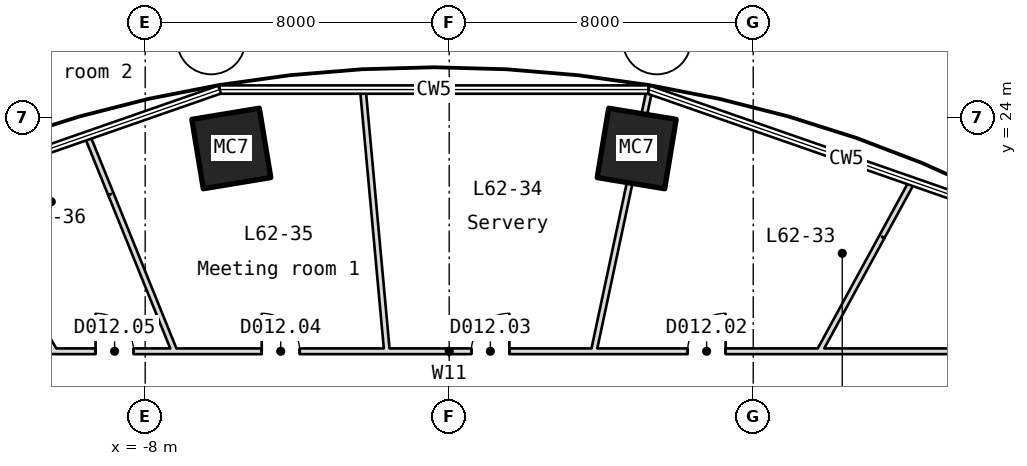
"""IFC4 building model, lengths in metres.
Left out: names, types, materials, properties, quantities, classifications, styles, units other than length and angle.
Written with IfcOpenShell. Run it as: python <this file> out.ifc"""

import sys

from ifc_helpers import new_model, si_unit, direction, frame, frame_2d, origin, origin_2d, place, context, subcontext, project, spatial, rectangle, hollow_rectangle, extrude, element, fill, save


model = new_model("IFC4")
c1 = context("Model", 3, precision=1e-05, world=origin(), true_north=direction((0.0, 1.0)))
c2 = subcontext(c1, "Body", "Model", "MODEL_VIEW")
j1 = project(units=[si_unit("LENGTHUNIT", "METRE"), si_unit("PLANEANGLEUNIT", "RADIAN")], contexts=[c1])
p1 = place(None, origin())
s1 = spatial("IfcSite", under=j1, at=p1, CompositionType="ELEMENT")
p2 = place(p1, origin())
s2 = spatial("IfcBuilding", under=s1, at=p2, CompositionType="ELEMENT")
p3 = place(p2, frame((0.0, 0.0, 279.1)))
s3 = spatial("IfcBuildingStorey", under=s2, at=p3, CompositionType="ELEMENT", Elevation=279.1)
for number, where, z_axis, x_axis in (
    (1, (4.933, 23.186, -0.25), (0.0, 0.0, 1.0), (0.987, -0.163, 0.0)),
    (2, (-5.733, 23.186, -0.25), (0.0, 0.0, 1.0), (0.987, 0.163, 0.0)),
):
    element("IfcColumn", number, at=place(p3, frame(where, z_axis=z_axis, x_axis=x_axis)), inside=s3, PredefinedType="COLUMN", context=c2, shape_type="SweptSolid", body=[
        extrude(hollow_rectangle(XDim=1.8, YDim=1.85, WallThickness=0.06, at=origin_2d()), origin(), (0.0, 0.0, 1.0), 5.47),
    ])
p4 = place(p3, frame((-15.009, 17.85, 0.0), z_axis=(0.0, 0.0, 1.0), x_axis=(1.0, 0.0, 0.0)))
e3 = element("IfcWall", 3, at=p4, inside=s3, PredefinedType="PARTITIONING", context=c2, shape_type="SweptSolid", body=[
    extrude(rectangle(XDim=30.018, YDim=0.15, at=frame_2d((15.009, 0.0))), origin(), (0.0, 0.0, 1.0), 5.22),
])
p5 = place(p4, frame((21.282, 0.0, 0.0)))
e4 = element("IfcOpeningElement", 4, at=p5, cuts=e3, PredefinedType="OPENING", context=c2, shape_type="SweptSolid", body=[
    extrude(rectangle(XDim=1.0, YDim=2.1, at=frame_2d((0.5, 1.05))), frame((0.0, 0.085, 0.0), z_axis=(0.0, -1.0, 0.0), x_axis=(1.0, 0.0, 0.0)), (0.0, 0.0, 1.0), 0.17),
])
p6 = place(p4, frame((15.592, 0.0, 0.0)))
e5 = element("IfcOpeningElement", 5, at=p6, cuts=e3, PredefinedType="OPENING", context=c2, shape_type="SweptSolid", body=[
    extrude(rectangle(XDim=1.0, YDim=2.1, at=frame_2d((0.5, 1.05))), frame((0.0, 0.085, 0.0), z_axis=(0.0, -1.0, 0.0), x_axis=(1.0, 0.0, 0.0)), (0.0, 0.0, 1.0), 0.17),
])
p7 = place(p4, frame((10.075, 0.0, 0.0)))
e6 = element("IfcOpeningElement", 6, at=p7, cuts=e3, PredefinedType="OPENING", context=c2, shape_type="SweptSolid", body=[
    extrude(rectangle(XDim=1.0, YDim=2.1, at=frame_2d((0.5, 1.05))), frame((0.0, 0.085, 0.0), z_axis=(0.0, -1.0, 0.0), x_axis=(1.0, 0.0, 0.0)), (0.0, 0.0, 1.0), 0.17),
])
p8 = place(p4, frame((5.704, 0.0, 0.0)))
e7 = element("IfcOpeningElement", 7, at=p8, cuts=e3, PredefinedType="OPENING", context=c2, shape_type="SweptSolid", body=[
    extrude(rectangle(XDim=1.0, YDim=2.1, at=frame_2d((0.5, 1.05))), frame((0.0, 0.085, 0.0), z_axis=(0.0, -1.0, 0.0), x_axis=(1.0, 0.0, 0.0)), (0.0, 0.0, 1.0), 0.17),
])
p9 = place(p4, frame((1.814, 0.0, 0.0)))
e8 = element("IfcOpeningElement", 8, at=p9, cuts=e3, PredefinedType="OPENING", context=c2, shape_type="SweptSolid", body=[
    extrude(rectangle(XDim=1.0, YDim=2.1, at=frame_2d((0.5, 1.05))), frame((0.0, 0.085, 0.0), z_axis=(0.0, -1.0, 0.0), x_axis=(1.0, 0.0, 0.0)), (0.0, 0.0, 1.0), 0.17),
])
p10 = place(p3, frame((9.742, 17.85, 0.0), z_axis=(0.0, 0.0, 1.0), x_axis=(0.479051311854, 0.877786899316, 0.0)))
e9 = element("IfcWall", 9, at=p10, inside=s3, PredefinedType="PARTITIONING", context=c2, shape_type="SweptSolid", body=[
    extrude(rectangle(XDim=3.435, YDim=0.15, at=frame_2d((1.717, 0.0))), origin(), (0.0, 0.0, 1.0), 4.803),
])
p11 = place(p3, frame((11.388, 20.865, 0.0), z_axis=(0.0, 0.0, 1.0), x_axis=(0.479134206063, 0.877741654805, 0.0)))
e10 = element("IfcWall", 10, at=p11, inside=s3, PredefinedType="PARTITIONING", context=c2, shape_type="SweptSolid", body=[
    extrude(rectangle(XDim=1.637, YDim=0.15, at=frame_2d((0.819, 0.0))), origin(), (0.0, 0.0, 1.0), 5.22),
])
p12 = place(p3, frame((3.804, 17.85, 0.0), z_axis=(0.0, 0.0, 1.0), x_axis=(0.208471298824, 0.978028485049, 0.0)))
e11 = element("IfcWall", 11, at=p12, inside=s3, PredefinedType="PARTITIONING", context=c2, shape_type="SweptSolid", body=[
    extrude(rectangle(XDim=5.029, YDim=0.15, at=frame_2d((2.514, 0.0))), origin(), (0.0, 0.0, 1.0), 4.684),
])
p13 = place(p3, frame((4.853, 22.768, 0.0), z_axis=(0.0, 0.0, 1.0), x_axis=(0.208468771503, 0.978029023755, 0.0)))
e12 = element("IfcWall", 12, at=p13, inside=s3, PredefinedType="PARTITIONING", context=c2, shape_type="SweptSolid", body=[
    extrude(rectangle(XDim=1.981, YDim=0.15, at=frame_2d((0.991, 0.0))), origin(), (0.0, 0.0, 1.0), 5.22),
])
p14 = place(p3, frame((-1.638, 17.85, 0.0), z_axis=(0.0, 0.0, 1.0), x_axis=(-0.091426453393, 0.995811831432, 0.0)))
e13 = element("IfcWall", 13, at=p14, inside=s3, PredefinedType="PARTITIONING", context=c2, shape_type="SweptSolid", body=[
    extrude(rectangle(XDim=6.895, YDim=0.15, at=frame_2d((3.447, 0.0))), origin(), (0.0, 0.0, 1.0), 5.22),
])
p15 = place(p3, frame((-7.229, 17.85, 0.0), z_axis=(0.0, 0.0, 1.0), x_axis=(-0.375357230071, 0.926880224103, 0.0)))
e14 = element("IfcWall", 14, at=p15, inside=s3, PredefinedType="PARTITIONING", context=c2, shape_type="SweptSolid", body=[
    extrude(rectangle(XDim=4.464, YDim=0.15, at=frame_2d((2.232, 0.0))), origin(), (0.0, 0.0, 1.0), 4.753),
])
p16 = place(p3, frame((-8.904, 21.988, 0.0), z_axis=(0.0, 0.0, 1.0), x_axis=(-0.375296508976, 0.926904811915, 0.0)))
e15 = element("IfcWall", 15, at=p16, inside=s3, PredefinedType="PARTITIONING", context=c2, shape_type="SweptSolid", body=[
    extrude(rectangle(XDim=1.637, YDim=0.15, at=frame_2d((0.818, 0.0))), origin(), (0.0, 0.0, 1.0), 5.22),
])
p17 = place(p3, frame((-10.382, 17.85, 0.0), z_axis=(0.0, 0.0, 1.0), x_axis=(-0.502765445724, 0.864422874863, 0.0)))
e16 = element("IfcWall", 16, at=p17, inside=s3, PredefinedType="PARTITIONING", context=c2, shape_type="SweptSolid", body=[
    extrude(rectangle(XDim=5.151, YDim=0.15, at=frame_2d((2.575, 0.0))), origin(), (0.0, 0.0, 1.0), 5.22),
])
p18 = place(p5, origin())
e17 = element("IfcDoor", 17, at=p18, inside=s3, OperationType="SINGLE_SWING_RIGHT", PredefinedType="DOOR", context=c2, shape_type="SweptSolid", body=[
    extrude(rectangle(XDim=1.0, YDim=2.1, at=frame_2d((0.5, 1.05))), frame((0.0, 0.025, 0.0), z_axis=(0.0, -1.0, 0.0), x_axis=(1.0, 0.0, 0.0)), (0.0, 0.0, 1.0), 0.05),
])
fill(e4, e17)
p19 = place(p6, origin())
e18 = element("IfcDoor", 18, at=p19, inside=s3, OperationType="SINGLE_SWING_RIGHT", PredefinedType="DOOR", context=c2, shape_type="SweptSolid", body=[
    extrude(rectangle(XDim=1.0, YDim=2.1, at=frame_2d((0.5, 1.05))), frame((0.0, 0.025, 0.0), z_axis=(0.0, -1.0, 0.0), x_axis=(1.0, 0.0, 0.0)), (0.0, 0.0, 1.0), 0.05),
])
fill(e5, e18)
p20 = place(p7, origin())
e19 = element("IfcDoor", 19, at=p20, inside=s3, OperationType="SINGLE_SWING_RIGHT", PredefinedType="DOOR", context=c2, shape_type="SweptSolid", body=[
    extrude(rectangle(XDim=1.0, YDim=2.1, at=frame_2d((0.5, 1.05))), frame((0.0, 0.025, 0.0), z_axis=(0.0, -1.0, 0.0), x_axis=(1.0, 0.0, 0.0)), (0.0, 0.0, 1.0), 0.05),
])
fill(e6, e19)
p21 = place(p8, origin())
e20 = element("IfcDoor", 20, at=p21, inside=s3, OperationType="SINGLE_SWING_RIGHT", PredefinedType="DOOR", context=c2, shape_type="SweptSolid", body=[
    extrude(rectangle(XDim=1.0, YDim=2.1, at=frame_2d((0.5, 1.05))), frame((0.0, 0.025, 0.0), z_axis=(0.0, -1.0, 0.0), x_axis=(1.0, 0.0, 0.0)), (0.0, 0.0, 1.0), 0.05),
])
fill(e7, e20)
save(model, sys.argv[1])
